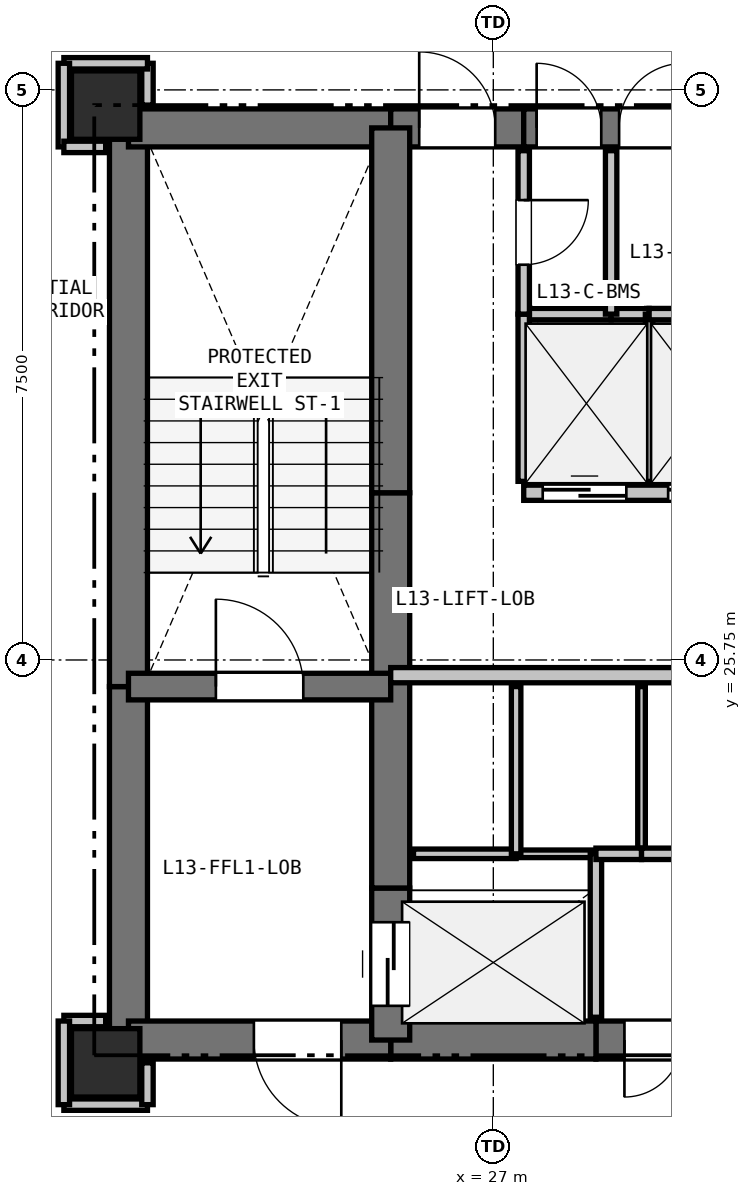
"""IFC4 building model, lengths in metres.
Left out: names, types, materials, properties, quantities, classifications, styles, units other than length and angle.
Written with IfcOpenShell. Run it as: python <this file> out.ifc"""

import sys

from ifc_helpers import new_model, si_unit, direction, frame, frame_2d, origin, origin_2d, place, context, subcontext, project, spatial, rectangle, extrude, element, fill, save


model = new_model("IFC4")
c1 = context("Model", 3, precision=1e-05, world=origin(), true_north=direction((0.0, 1.0)))
c2 = subcontext(c1, "Body", "Model", "MODEL_VIEW")
j1 = project(units=[si_unit("LENGTHUNIT", "METRE"), si_unit("PLANEANGLEUNIT", "RADIAN")], contexts=[c1])
p1 = place(None, origin())
s1 = spatial("IfcSite", under=j1, at=p1, CompositionType="ELEMENT")
p2 = place(p1, origin())
s2 = spatial("IfcBuilding", under=s1, at=p2, CompositionType="ELEMENT")
p3 = place(p2, frame((0.0, 0.0, 48.9)))
s3 = spatial("IfcBuildingStorey", under=s2, at=p3, CompositionType="ELEMENT", Elevation=48.9)
for number, where, z_axis, x_axis in (
    (1, (21.9, 20.45, 0.0), (0.0, 0.0, 1.0), (1.0, 0.0, 0.0)),
    (2, (21.9, 33.05, 0.0), (0.0, 0.0, 1.0), (1.0, 0.0, 0.0)),
):
    element("IfcColumn", number, at=place(p3, frame(where, z_axis=z_axis, x_axis=x_axis)), inside=s3, PredefinedType="COLUMN", context=c2, shape_type="SweptSolid", body=[
        extrude(rectangle(XDim=0.9, YDim=0.9, at=origin_2d()), origin(), (0.0, 0.0, 1.0), 3.3),
    ])
p4 = place(p3, frame((22.2, 20.75, 0.0), z_axis=(0.0, 0.0, 1.0), x_axis=(0.0, 1.0, 0.0)))
e3 = element("IfcWall", 3, at=p4, inside=s3, PredefinedType="SHEAR", context=c2, shape_type="SweptSolid", body=[
    extrude(rectangle(XDim=4.65, YDim=0.5, at=frame_2d((2.325, 0.0))), origin(), (0.0, 0.0, 1.0), 3.04),
])
p5 = place(p3, frame((22.2, 25.4, 0.0), z_axis=(0.0, 0.0, 1.0), x_axis=(0.0, 1.0, 0.0)))
e4 = element("IfcWall", 4, at=p5, inside=s3, PredefinedType="SHEAR", context=c2, shape_type="SweptSolid", body=[
    extrude(rectangle(XDim=7.35, YDim=0.5, at=frame_2d((3.675, 0.0))), origin(), (0.0, 0.0, 1.0), 3.04),
])
p6 = place(p3, frame((22.2, 32.75, 0.0), z_axis=(0.0, 0.0, 1.0), x_axis=(1.0, 0.0, 0.0)))
e5 = element("IfcWall", 5, at=p6, inside=s3, PredefinedType="SHEAR", context=c2, shape_type="SweptSolid", body=[
    extrude(rectangle(XDim=3.45, YDim=0.5, at=frame_2d((1.725, 0.0))), origin(), (0.0, 0.0, 1.0), 3.04),
])
p7 = place(p3, frame((25.65, 32.75, 0.0), z_axis=(0.0, 0.0, 1.0), x_axis=(1.0, 0.0, 0.0)))
e6 = element("IfcWall", 6, at=p7, inside=s3, PredefinedType="SHEAR", context=c2, shape_type="SweptSolid", body=[
    extrude(rectangle(XDim=1.75, YDim=0.5, at=frame_2d((0.875, 0.0))), origin(), (0.0, 0.0, 1.0), 3.04),
])
p8 = place(p7, frame((0.375, 0.0, 0.0)))
e7 = element("IfcOpeningElement", 7, at=p8, cuts=e6, PredefinedType="OPENING", context=c2, shape_type="SweptSolid", body=[
    extrude(rectangle(XDim=1.0, YDim=2.15, at=frame_2d((0.5, 1.075))), frame((0.0, 0.26, 0.0), z_axis=(0.0, -1.0, 0.0), x_axis=(1.0, 0.0, 0.0)), (0.0, 0.0, 1.0), 0.52),
])
p9 = place(p3, frame((27.4, 32.75, 0.0), z_axis=(0.0, 0.0, 1.0), x_axis=(1.0, 0.0, 0.0)))
e8 = element("IfcWall", 8, at=p9, inside=s3, PredefinedType="SHEAR", context=c2, shape_type="SweptSolid", body=[
    extrude(rectangle(XDim=2.25, YDim=0.5, at=frame_2d((1.125, 0.0))), origin(), (0.0, 0.0, 1.0), 3.04),
])
p10 = place(p9, frame((0.17, 0.0, 0.0)))
e9 = element("IfcOpeningElement", 9, at=p10, cuts=e8, PredefinedType="OPENING", context=c2, shape_type="SweptSolid", body=[
    extrude(rectangle(XDim=0.85, YDim=2.1, at=frame_2d((0.425, 1.05))), frame((0.0, 0.26, 0.0), z_axis=(0.0, -1.0, 0.0), x_axis=(1.0, 0.0, 0.0)), (0.0, 0.0, 1.0), 0.52),
])
p11 = place(p9, frame((1.255, 0.0, 0.0)))
e10 = element("IfcOpeningElement", 10, at=p11, cuts=e8, PredefinedType="OPENING", context=c2, shape_type="SweptSolid", body=[
    extrude(rectangle(XDim=0.85, YDim=2.1, at=frame_2d((0.425, 1.05))), frame((0.0, 0.26, 0.0), z_axis=(0.0, -1.0, 0.0), x_axis=(1.0, 0.0, 0.0)), (0.0, 0.0, 1.0), 0.52),
])
p12 = place(p3, frame((30.6, 20.75, 0.0), z_axis=(0.0, 0.0, 1.0), x_axis=(-1.0, 0.0, 0.0)))
e11 = element("IfcWall", 11, at=p12, inside=s3, PredefinedType="SHEAR", context=c2, shape_type="SweptSolid", body=[
    extrude(rectangle(XDim=2.25, YDim=0.5, at=frame_2d((1.125, 0.0))), origin(), (0.0, 0.0, 1.0), 3.04),
])
p13 = place(p12, frame((0.375, 0.0, 0.0)))
e12 = element("IfcOpeningElement", 12, at=p13, cuts=e11, PredefinedType="OPENING", context=c2, shape_type="SweptSolid", body=[
    extrude(rectangle(XDim=1.5, YDim=2.2, at=frame_2d((0.75, 1.1))), frame((0.0, 0.26, 0.0), z_axis=(0.0, -1.0, 0.0), x_axis=(1.0, 0.0, 0.0)), (0.0, 0.0, 1.0), 0.52),
])
p14 = place(p3, frame((28.35, 20.75, 0.0), z_axis=(0.0, 0.0, 1.0), x_axis=(-1.0, 0.0, 0.0)))
e13 = element("IfcWall", 13, at=p14, inside=s3, PredefinedType="SHEAR", context=c2, shape_type="SweptSolid", body=[
    extrude(rectangle(XDim=2.7, YDim=0.5, at=frame_2d((1.35, 0.0))), origin(), (0.0, 0.0, 1.0), 3.04),
])
p15 = place(p3, frame((25.65, 20.75, 0.0), z_axis=(0.0, 0.0, 1.0), x_axis=(-1.0, 0.0, 0.0)))
e14 = element("IfcWall", 14, at=p15, inside=s3, PredefinedType="SHEAR", context=c2, shape_type="SweptSolid", body=[
    extrude(rectangle(XDim=3.45, YDim=0.5, at=frame_2d((1.725, 0.0))), origin(), (0.0, 0.0, 1.0), 3.04),
])
p16 = place(p15, frame((0.65, 0.0, 0.0)))
e15 = element("IfcOpeningElement", 15, at=p16, cuts=e14, PredefinedType="OPENING", context=c2, shape_type="SweptSolid", body=[
    extrude(rectangle(XDim=1.15, YDim=2.15, at=frame_2d((0.575, 1.075))), frame((0.0, 0.26, 0.0), z_axis=(0.0, -1.0, 0.0), x_axis=(1.0, 0.0, 0.0)), (0.0, 0.0, 1.0), 0.52),
])
p17 = place(p3, frame((25.65, 20.75, 0.0), z_axis=(0.0, 0.0, 1.0), x_axis=(0.0, 1.0, 0.0)))
e16 = element("IfcWall", 16, at=p17, inside=s3, PredefinedType="SHEAR", context=c2, shape_type="SweptSolid", body=[
    extrude(rectangle(XDim=2.0, YDim=0.5, at=frame_2d((1.0, 0.0))), origin(), (0.0, 0.0, 1.0), 3.04),
])
p18 = place(p17, frame((0.45, 0.0, 0.0)))
e17 = element("IfcOpeningElement", 17, at=p18, cuts=e16, PredefinedType="OPENING", context=c2, shape_type="SweptSolid", body=[
    extrude(rectangle(XDim=1.1, YDim=2.15, at=frame_2d((0.55, 1.075))), frame((0.0, 0.26, 0.0), z_axis=(0.0, -1.0, 0.0), x_axis=(1.0, 0.0, 0.0)), (0.0, 0.0, 1.0), 0.52),
])
p19 = place(p3, frame((25.65, 22.75, 0.0), z_axis=(0.0, 0.0, 1.0), x_axis=(0.0, 1.0, 0.0)))
e18 = element("IfcWall", 18, at=p19, inside=s3, PredefinedType="SHEAR", context=c2, shape_type="SweptSolid", body=[
    extrude(rectangle(XDim=2.8, YDim=0.5, at=frame_2d((1.4, 0.0))), origin(), (0.0, 0.0, 1.0), 3.04),
])
p20 = place(p3, frame((25.65, 25.55, 0.0), z_axis=(0.0, 0.0, 1.0), x_axis=(0.0, 1.0, 0.0)))
e19 = element("IfcWall", 19, at=p20, inside=s3, PredefinedType="SHEAR", context=c2, shape_type="SweptSolid", body=[
    extrude(rectangle(XDim=2.4, YDim=0.5, at=frame_2d((1.2, 0.0))), origin(), (0.0, 0.0, 1.0), 3.04),
])
p21 = place(p3, frame((25.65, 27.95, 0.0), z_axis=(0.0, 0.0, 1.0), x_axis=(0.0, 1.0, 0.0)))
e20 = element("IfcWall", 20, at=p21, inside=s3, PredefinedType="SHEAR", context=c2, shape_type="SweptSolid", body=[
    extrude(rectangle(XDim=4.8, YDim=0.5, at=frame_2d((2.4, 0.0))), origin(), (0.0, 0.0, 1.0), 3.04),
])
p22 = place(p3, frame((22.2, 25.4, 0.0), z_axis=(0.0, 0.0, 1.0), x_axis=(1.0, 0.0, 0.0)))
e21 = element("IfcWall", 21, at=p22, inside=s3, PredefinedType="SHEAR", context=c2, shape_type="SweptSolid", body=[
    extrude(rectangle(XDim=3.45, YDim=0.35, at=frame_2d((1.725, 0.0))), origin(), (0.0, 0.0, 1.0), 3.04),
])
p23 = place(p22, frame((1.15, 0.0, 0.0)))
e22 = element("IfcOpeningElement", 22, at=p23, cuts=e21, PredefinedType="OPENING", context=c2, shape_type="SweptSolid", body=[
    extrude(rectangle(XDim=1.15, YDim=2.15, at=frame_2d((0.575, 1.075))), frame((0.0, 0.185, 0.0), z_axis=(0.0, -1.0, 0.0), x_axis=(1.0, 0.0, 0.0)), (0.0, 0.0, 1.0), 0.37),
])
p24 = place(p3, frame((25.65, 25.55, 0.0), z_axis=(0.0, 0.0, 1.0), x_axis=(1.0, 0.0, 0.0)))
e23 = element("IfcWall", 23, at=p24, inside=s3, PredefinedType="PARTITIONING", context=c2, shape_type="SweptSolid", body=[
    extrude(rectangle(XDim=4.95, YDim=0.2, at=frame_2d((2.475, 0.0))), origin(), (0.0, 0.0, 1.0), 3.04),
])
p25 = place(p3, frame((27.4, 27.95, 0.0), z_axis=(0.0, 0.0, 1.0), x_axis=(1.0, 0.0, 0.0)))
e24 = element("IfcWall", 24, at=p25, inside=s3, PredefinedType="PARTITIONING", context=c2, shape_type="SweptSolid", body=[
    extrude(rectangle(XDim=4.95, YDim=0.2, at=frame_2d((2.475, 0.0))), origin(), (0.0, 0.0, 1.0), 3.04),
])
p26 = place(p25, frame((0.25, 0.0, 0.0)))
e25 = element("IfcOpeningElement", 25, at=p26, cuts=e24, PredefinedType="OPENING", context=c2, shape_type="SweptSolid", body=[
    extrude(rectangle(XDim=1.1, YDim=2.15, at=frame_2d((0.55, 1.075))), frame((0.0, 0.11, 0.0), z_axis=(0.0, -1.0, 0.0), x_axis=(1.0, 0.0, 0.0)), (0.0, 0.0, 1.0), 0.22),
])
p27 = place(p25, frame((1.9, 0.0, 0.0)))
e26 = element("IfcOpeningElement", 26, at=p27, cuts=e24, PredefinedType="OPENING", context=c2, shape_type="SweptSolid", body=[
    extrude(rectangle(XDim=1.1, YDim=2.15, at=frame_2d((0.55, 1.075))), frame((0.0, 0.11, 0.0), z_axis=(0.0, -1.0, 0.0), x_axis=(1.0, 0.0, 0.0)), (0.0, 0.0, 1.0), 0.22),
])
p28 = place(p25, frame((3.55, 0.0, 0.0)))
e27 = element("IfcOpeningElement", 27, at=p28, cuts=e24, PredefinedType="OPENING", context=c2, shape_type="SweptSolid", body=[
    extrude(rectangle(XDim=1.1, YDim=2.15, at=frame_2d((0.55, 1.075))), frame((0.0, 0.11, 0.0), z_axis=(0.0, -1.0, 0.0), x_axis=(1.0, 0.0, 0.0)), (0.0, 0.0, 1.0), 0.22),
])
p29 = place(p3, frame((25.95, 23.2, 0.0), z_axis=(0.0, 0.0, 1.0), x_axis=(1.0, 0.0, 0.0)))
e28 = element("IfcWall", 28, at=p29, inside=s3, PredefinedType="PARTITIONING", context=c2, shape_type="SweptSolid", body=[
    extrude(rectangle(XDim=1.35, YDim=0.125, at=frame_2d((0.675, 0.0))), origin(), (0.0, 0.0, 1.0), 3.04),
])
p30 = place(p3, frame((27.3, 23.2, 0.0), z_axis=(0.0, 0.0, 1.0), x_axis=(1.0, 0.0, 0.0)))
e29 = element("IfcWall", 29, at=p30, inside=s3, PredefinedType="PARTITIONING", context=c2, shape_type="SweptSolid", body=[
    extrude(rectangle(XDim=1.05, YDim=0.1, at=frame_2d((0.525, 0.0))), origin(), (0.0, 0.0, 1.0), 3.04),
])
p31 = place(p3, frame((28.35, 23.2, 0.0), z_axis=(0.0, 0.0, 1.0), x_axis=(0.0, -1.0, 0.0)))
e30 = element("IfcWall", 30, at=p31, inside=s3, PredefinedType="PARTITIONING", context=c2, shape_type="SweptSolid", body=[
    extrude(rectangle(XDim=2.15, YDim=0.15, at=frame_2d((1.075, 0.0))), origin(), (0.0, 0.0, 1.0), 3.04),
])
p32 = place(p3, frame((27.3, 25.4, 0.0), z_axis=(0.0, 0.0, 1.0), x_axis=(0.0, -1.0, 0.0)))
e31 = element("IfcWall", 31, at=p32, inside=s3, PredefinedType="PARTITIONING", context=c2, shape_type="SweptSolid", body=[
    extrude(rectangle(XDim=2.2, YDim=0.125, at=frame_2d((1.1, 0.0))), origin(), (0.0, 0.0, 1.0), 3.04),
])
p33 = place(p3, frame((28.95, 25.4, 0.0), z_axis=(0.0, 0.0, 1.0), x_axis=(0.0, -1.0, 0.0)))
e32 = element("IfcWall", 32, at=p33, inside=s3, PredefinedType="PARTITIONING", context=c2, shape_type="SweptSolid", body=[
    extrude(rectangle(XDim=2.2, YDim=0.1, at=frame_2d((1.1, 0.0))), origin(), (0.0, 0.0, 1.0), 3.04),
])
p34 = place(p3, frame((28.95, 23.2, 0.0), z_axis=(0.0, 0.0, 1.0), x_axis=(-1.0, 0.0, 0.0)))
e33 = element("IfcWall", 33, at=p34, inside=s3, PredefinedType="PARTITIONING", context=c2, shape_type="SweptSolid", body=[
    extrude(rectangle(XDim=0.6, YDim=0.15, at=frame_2d((0.3, 0.0))), origin(), (0.0, 0.0, 1.0), 3.04),
])
p35 = place(p3, frame((30.6, 23.2, 0.0), z_axis=(0.0, 0.0, 1.0), x_axis=(-1.0, 0.0, 0.0)))
e34 = element("IfcWall", 34, at=p35, inside=s3, PredefinedType="PARTITIONING", context=c2, shape_type="SweptSolid", body=[
    extrude(rectangle(XDim=1.65, YDim=0.15, at=frame_2d((0.825, 0.0))), origin(), (0.0, 0.0, 1.0), 3.04),
])
p36 = place(p3, frame((27.4, 30.3, 0.0), z_axis=(0.0, 0.0, 1.0), x_axis=(1.0, 0.0, 0.0)))
e35 = element("IfcWall", 35, at=p36, inside=s3, PredefinedType="PARTITIONING", context=c2, shape_type="SweptSolid", body=[
    extrude(rectangle(XDim=1.15, YDim=0.15, at=frame_2d((0.575, 0.0))), origin(), (0.0, 0.0, 1.0), 3.04),
])
p37 = place(p3, frame((28.55, 30.3, 0.0), z_axis=(0.0, 0.0, 1.0), x_axis=(1.0, 0.0, 0.0)))
e36 = element("IfcWall", 36, at=p37, inside=s3, PredefinedType="PARTITIONING", context=c2, shape_type="SweptSolid", body=[
    extrude(rectangle(XDim=0.5, YDim=0.15, at=frame_2d((0.25, 0.0))), origin(), (0.0, 0.0, 1.0), 3.04),
])
p38 = place(p3, frame((29.05, 30.3, 0.0), z_axis=(0.0, 0.0, 1.0), x_axis=(0.0, -1.0, 0.0)))
e37 = element("IfcWall", 37, at=p38, inside=s3, PredefinedType="PARTITIONING", context=c2, shape_type="SweptSolid", body=[
    extrude(rectangle(XDim=2.2, YDim=0.1, at=frame_2d((1.1, 0.0))), origin(), (0.0, 0.0, 1.0), 3.04),
])
p39 = place(p3, frame((27.4, 28.1, 0.0), z_axis=(0.0, 0.0, 1.0), x_axis=(0.0, 1.0, 0.0)))
e38 = element("IfcWall", 38, at=p39, inside=s3, PredefinedType="PARTITIONING", context=c2, shape_type="SweptSolid", body=[
    extrude(rectangle(XDim=2.2, YDim=0.15, at=frame_2d((1.1, 0.0))), origin(), (0.0, 0.0, 1.0), 3.04),
])
p40 = place(p3, frame((29.05, 30.3, 0.0), z_axis=(0.0, 0.0, 1.0), x_axis=(1.0, 0.0, 0.0)))
e39 = element("IfcWall", 39, at=p40, inside=s3, PredefinedType="PARTITIONING", context=c2, shape_type="SweptSolid", body=[
    extrude(rectangle(XDim=0.6, YDim=0.15, at=frame_2d((0.3, 0.0))), origin(), (0.0, 0.0, 1.0), 3.04),
])
p41 = place(p3, frame((27.4, 32.45, 0.0), z_axis=(0.0, 0.0, 1.0), x_axis=(0.0, -1.0, 0.0)))
e40 = element("IfcWall", 40, at=p41, inside=s3, PredefinedType="PARTITIONING", context=c2, shape_type="SweptSolid", body=[
    extrude(rectangle(XDim=2.15, YDim=0.15, at=frame_2d((1.075, 0.0))), origin(), (0.0, 0.0, 1.0), 3.04),
])
p42 = place(p41, frame((0.65, 0.0, 0.0)))
e41 = element("IfcOpeningElement", 41, at=p42, cuts=e40, PredefinedType="OPENING", context=c2, shape_type="SweptSolid", body=[
    extrude(rectangle(XDim=0.85, YDim=2.1, at=frame_2d((0.425, 1.05))), frame((0.0, 0.085, 0.0), z_axis=(0.0, -1.0, 0.0), x_axis=(1.0, 0.0, 0.0)), (0.0, 0.0, 1.0), 0.17),
])
p43 = place(p3, frame((21.35, 19.9, 0.0), z_axis=(0.0, 0.0, 1.0), x_axis=(1.0, 0.0, 0.0)))
e42 = element("IfcWall", 42, at=p43, inside=s3, PredefinedType="PARTITIONING", context=c2, shape_type="SweptSolid", body=[
    extrude(rectangle(XDim=1.1, YDim=0.15, at=frame_2d((0.55, 0.0))), origin(), (0.0, 0.0, 1.0), 2.338),
])
p44 = place(p3, frame((22.45, 19.9, 0.0), z_axis=(0.0, 0.0, 1.0), x_axis=(0.0, 1.0, 0.0)))
e43 = element("IfcWall", 43, at=p44, inside=s3, PredefinedType="PARTITIONING", context=c2, shape_type="SweptSolid", body=[
    extrude(rectangle(XDim=0.55, YDim=0.15, at=frame_2d((0.275, 0.0))), origin(), (0.0, 0.0, 1.0), 2.338),
])
p45 = place(p3, frame((22.45, 33.05, 0.0), z_axis=(0.0, 0.0, 1.0), x_axis=(0.0, 1.0, 0.0)))
e44 = element("IfcWall", 44, at=p45, inside=s3, PredefinedType="PARTITIONING", context=c2, shape_type="SweptSolid", body=[
    extrude(rectangle(XDim=0.55, YDim=0.15, at=frame_2d((0.275, 0.0))), origin(), (0.0, 0.0, 1.0), 2.488),
])
p46 = place(p3, frame((22.45, 33.6, 0.0), z_axis=(0.0, 0.0, 1.0), x_axis=(-1.0, 0.0, 0.0)))
e45 = element("IfcWall", 45, at=p46, inside=s3, PredefinedType="PARTITIONING", context=c2, shape_type="SweptSolid", body=[
    extrude(rectangle(XDim=1.1, YDim=0.15, at=frame_2d((0.55, 0.0))), origin(), (0.0, 0.0, 1.0), 3.04),
])
p47 = place(p3, frame((21.35, 33.6, 0.0), z_axis=(0.0, 0.0, 1.0), x_axis=(0.0, -1.0, 0.0)))
e46 = element("IfcWall", 46, at=p47, inside=s3, PredefinedType="PARTITIONING", context=c2, shape_type="SweptSolid", body=[
    extrude(rectangle(XDim=1.1, YDim=0.15, at=frame_2d((0.55, 0.0))), origin(), (0.0, 0.0, 1.0), 2.338),
])
for number, where, z_axis, x_axis in (
    (47, (21.35, 32.5, 0.0), (0.0, 0.0, 1.0), (1.0, 0.0, 0.0)),
    (48, (21.9, 21.0, 0.0), (0.0, 0.0, 1.0), (-1.0, 0.0, 0.0)),
):
    element("IfcWall", number, at=place(p3, frame(where, z_axis=z_axis, x_axis=x_axis)), inside=s3, PredefinedType="PARTITIONING", context=c2, shape_type="SweptSolid", body=[
        extrude(rectangle(XDim=0.55, YDim=0.15, at=frame_2d((0.275, 0.0))), origin(), (0.0, 0.0, 1.0), 2.488),
    ])
p48 = place(p3, frame((21.35, 21.0, 0.0), z_axis=(0.0, 0.0, 1.0), x_axis=(0.0, -1.0, 0.0)))
e49 = element("IfcWall", 49, at=p48, inside=s3, PredefinedType="PARTITIONING", context=c2, shape_type="SweptSolid", body=[
    extrude(rectangle(XDim=1.1, YDim=0.15, at=frame_2d((0.55, 0.0))), origin(), (0.0, 0.0, 1.0), 2.338),
])
p49 = place(p3, frame((28.55, 32.45, 0.0), z_axis=(0.0, 0.0, 1.0), x_axis=(0.0, -1.0, 0.0)))
e50 = element("IfcWall", 50, at=p49, inside=s3, PredefinedType="PARTITIONING", context=c2, shape_type="SweptSolid", body=[
    extrude(rectangle(XDim=2.15, YDim=0.15, at=frame_2d((1.075, 0.0))), origin(), (0.0, 0.0, 1.0), 3.04),
])
p50 = place(p26, origin())
e51 = element("IfcDoor", 51, at=p50, inside=s3, OperationType="SLIDING_TO_LEFT", PredefinedType="DOOR", context=c2, shape_type="SweptSolid", body=[
    extrude(rectangle(XDim=1.1, YDim=2.15, at=frame_2d((0.55, 1.075))), frame((0.0, 0.025, 0.0), z_axis=(0.0, -1.0, 0.0), x_axis=(1.0, 0.0, 0.0)), (0.0, 0.0, 1.0), 0.05),
])
fill(e25, e51)
p51 = place(p27, origin())
e52 = element("IfcDoor", 52, at=p51, inside=s3, OperationType="SLIDING_TO_LEFT", PredefinedType="DOOR", context=c2, shape_type="SweptSolid", body=[
    extrude(rectangle(XDim=1.1, YDim=2.15, at=frame_2d((0.55, 1.075))), frame((0.0, 0.025, 0.0), z_axis=(0.0, -1.0, 0.0), x_axis=(1.0, 0.0, 0.0)), (0.0, 0.0, 1.0), 0.05),
])
fill(e26, e52)
p52 = place(p8, origin())
e53 = element("IfcDoor", 53, at=p52, inside=s3, OperationType="SINGLE_SWING_LEFT", PredefinedType="DOOR", context=c2, shape_type="SweptSolid", body=[
    extrude(rectangle(XDim=1.0, YDim=2.15, at=frame_2d((0.5, 1.075))), frame((0.0, 0.025, 0.0), z_axis=(0.0, -1.0, 0.0), x_axis=(1.0, 0.0, 0.0)), (0.0, 0.0, 1.0), 0.05),
])
fill(e7, e53)
p53 = place(p18, origin())
e54 = element("IfcDoor", 54, at=p53, inside=s3, OperationType="SLIDING_TO_LEFT", PredefinedType="DOOR", context=c2, shape_type="SweptSolid", body=[
    extrude(rectangle(XDim=1.1, YDim=2.15, at=frame_2d((0.55, 1.075))), frame((0.0, 0.025, 0.0), z_axis=(0.0, -1.0, 0.0), x_axis=(1.0, 0.0, 0.0)), (0.0, 0.0, 1.0), 0.05),
])
fill(e17, e54)
p54 = place(p23, origin())
e55 = element("IfcDoor", 55, at=p54, inside=s3, OperationType="SINGLE_SWING_LEFT", PredefinedType="DOOR", context=c2, shape_type="SweptSolid", body=[
    extrude(rectangle(XDim=1.15, YDim=2.15, at=frame_2d((0.575, 1.075))), frame((0.0, 0.025, 0.0), z_axis=(0.0, -1.0, 0.0), x_axis=(1.0, 0.0, 0.0)), (0.0, 0.0, 1.0), 0.05),
])
fill(e22, e55)
p55 = place(p16, origin())
e56 = element("IfcDoor", 56, at=p55, inside=s3, OperationType="SINGLE_SWING_LEFT", PredefinedType="DOOR", context=c2, shape_type="SweptSolid", body=[
    extrude(rectangle(XDim=1.15, YDim=2.15, at=frame_2d((0.575, 1.075))), frame((0.0, 0.025, 0.0), z_axis=(0.0, -1.0, 0.0), x_axis=(1.0, 0.0, 0.0)), (0.0, 0.0, 1.0), 0.05),
])
fill(e15, e56)
p56 = place(p13, origin())
e57 = element("IfcDoor", 57, at=p56, inside=s3, OperationType="DOUBLE_DOOR_SINGLE_SWING", PredefinedType="DOOR", context=c2, shape_type="SweptSolid", body=[
    extrude(rectangle(XDim=1.5, YDim=2.2, at=frame_2d((0.75, 1.1))), frame((0.0, 0.025, 0.0), z_axis=(0.0, -1.0, 0.0), x_axis=(1.0, 0.0, 0.0)), (0.0, 0.0, 1.0), 0.05),
])
fill(e12, e57)
p57 = place(p42, origin())
e58 = element("IfcDoor", 58, at=p57, inside=s3, OperationType="SINGLE_SWING_LEFT", PredefinedType="DOOR", context=c2, shape_type="SweptSolid", body=[
    extrude(rectangle(XDim=0.85, YDim=2.1, at=frame_2d((0.425, 1.05))), frame((0.0, 0.025, 0.0), z_axis=(0.0, -1.0, 0.0), x_axis=(1.0, 0.0, 0.0)), (0.0, 0.0, 1.0), 0.05),
])
fill(e41, e58)
p58 = place(p10, origin())
e59 = element("IfcDoor", 59, at=p58, inside=s3, OperationType="SINGLE_SWING_LEFT", PredefinedType="DOOR", context=c2, shape_type="SweptSolid", body=[
    extrude(rectangle(XDim=0.85, YDim=2.1, at=frame_2d((0.425, 1.05))), frame((0.0, 0.025, 0.0), z_axis=(0.0, -1.0, 0.0), x_axis=(1.0, 0.0, 0.0)), (0.0, 0.0, 1.0), 0.05),
])
fill(e9, e59)
p59 = place(p11, origin())
e60 = element("IfcDoor", 60, at=p59, inside=s3, OperationType="SINGLE_SWING_RIGHT", PredefinedType="DOOR", context=c2, shape_type="SweptSolid", body=[
    extrude(rectangle(XDim=0.85, YDim=2.1, at=frame_2d((0.425, 1.05))), frame((0.0, 0.025, 0.0), z_axis=(0.0, -1.0, 0.0), x_axis=(1.0, 0.0, 0.0)), (0.0, 0.0, 1.0), 0.05),
])
fill(e10, e60)
save(model, sys.argv[1])
